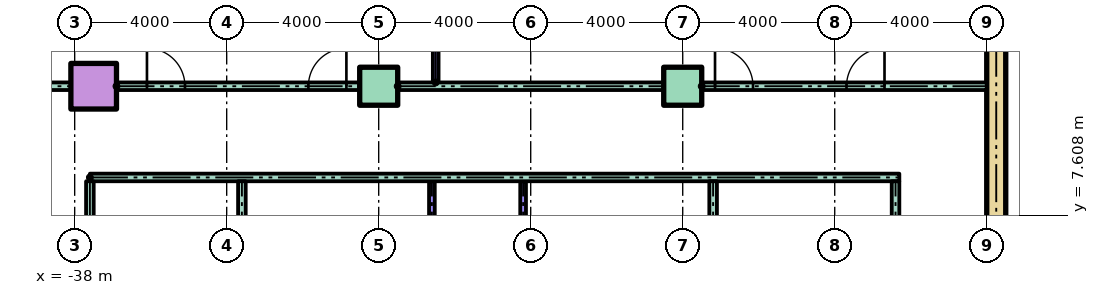
"""IFC4 building model, lengths in metres.
Left out: names, types, materials, properties, quantities, classifications, styles, units other than length and angle.
Written with IfcOpenShell. Run it as: python <this file> out.ifc"""

import sys

from ifc_helpers import new_model, si_unit, direction, frame, frame_2d, origin, origin_2d, place, context, subcontext, project, spatial, rectangle, hollow_rectangle, extrude, element, fill, save


model = new_model("IFC4")
c1 = context("Model", 3, precision=1e-05, world=origin(), true_north=direction((0.0, 1.0)))
c2 = subcontext(c1, "Body", "Model", "MODEL_VIEW")
j1 = project(units=[si_unit("LENGTHUNIT", "METRE"), si_unit("PLANEANGLEUNIT", "RADIAN")], contexts=[c1])
p1 = place(None, origin())
s1 = spatial("IfcSite", under=j1, at=p1, CompositionType="ELEMENT")
p2 = place(p1, origin())
s2 = spatial("IfcBuilding", under=s1, at=p2, CompositionType="ELEMENT")
p3 = place(p2, frame((0.0, 0.0, 14.0)))
s3 = spatial("IfcBuildingStorey", under=s2, at=p3, CompositionType="ELEMENT", Elevation=14.0)
p4 = place(p3, frame((-37.5, 11.0, 0.0)))
e1 = element("IfcColumn", 1, at=p4, inside=s3, PredefinedType="COLUMN", context=c2, shape_type="SweptSolid", body=[
    extrude(hollow_rectangle(XDim=1.2, YDim=1.2, WallThickness=0.06, at=origin_2d()), origin(), (0.0, 0.0, 1.0), 4.0),
])
for number, where in (
    (2, (-30.0, 11.0, 0.0)),
    (3, (-22.0, 11.0, 0.0)),
):
    element("IfcColumn", number, at=place(p3, frame(where)), inside=s3, PredefinedType="COLUMN", context=c2, shape_type="SweptSolid", body=[
        extrude(rectangle(XDim=1.0, YDim=1.0, at=origin_2d()), origin(), (0.0, 0.0, 1.0), 4.0),
    ])
p5 = place(p3, frame((-13.75, 3.0, 0.0), z_axis=(0.0, 0.0, 1.0), x_axis=(0.0, 1.0, 0.0)))
e4 = element("IfcWall", 4, at=p5, inside=s3, PredefinedType="SHEAR", context=c2, shape_type="SweptSolid", body=[
    extrude(rectangle(XDim=17.0, YDim=0.5, at=frame_2d((8.5, 0.0))), origin(), (0.0, 0.0, 1.0), 3.7),
])
p6 = place(p3, frame((-37.6, 8.6, 0.0)))
e5 = element("IfcWall", 5, at=p6, inside=s3, PredefinedType="PARTITIONING", context=c2, shape_type="SweptSolid", body=[
    extrude(rectangle(XDim=21.3, YDim=0.2, at=frame_2d((10.65, 0.0))), origin(), (0.0, 0.0, 1.0), 3.7),
])
p7 = place(p3, frame((-39.6, 11.0, 0.0)))
e6 = element("IfcWall", 6, at=p7, inside=s3, PredefinedType="PARTITIONING", context=c2, shape_type="SweptSolid", body=[
    extrude(rectangle(XDim=1.5, YDim=0.2, at=frame_2d((0.75, 0.0))), origin(), (0.0, 0.0, 1.0), 3.7),
])
p8 = place(p3, frame((-36.9, 11.0, 0.0)))
e7 = element("IfcWall", 7, at=p8, inside=s3, PredefinedType="PARTITIONING", context=c2, shape_type="SweptSolid", body=[
    extrude(rectangle(XDim=6.4, YDim=0.2, at=frame_2d((3.2, 0.0))), origin(), (0.0, 0.0, 1.0), 3.7),
])
p9 = place(p8, frame((0.802, 0.0, 0.0)))
e8 = element("IfcOpeningElement", 8, at=p9, cuts=e7, PredefinedType="OPENING", context=c2, shape_type="SweptSolid", body=[
    extrude(rectangle(XDim=1.0, YDim=2.1, at=frame_2d((0.5, 1.05))), frame((0.0, 0.11, 0.0), z_axis=(0.0, -1.0, 0.0), x_axis=(1.0, 0.0, 0.0)), (0.0, 0.0, 1.0), 0.22),
])
p10 = place(p8, frame((5.05, 0.0, 0.0)))
e9 = element("IfcOpeningElement", 9, at=p10, cuts=e7, PredefinedType="OPENING", context=c2, shape_type="SweptSolid", body=[
    extrude(rectangle(XDim=1.0, YDim=2.1, at=frame_2d((0.5, 1.05))), frame((0.0, 0.11, 0.0), z_axis=(0.0, -1.0, 0.0), x_axis=(1.0, 0.0, 0.0)), (0.0, 0.0, 1.0), 0.22),
])
p11 = place(p3, frame((-29.5, 11.0, 0.0)))
e10 = element("IfcWall", 10, at=p11, inside=s3, PredefinedType="PARTITIONING", context=c2, shape_type="SweptSolid", body=[
    extrude(rectangle(XDim=7.0, YDim=0.2, at=frame_2d((3.5, 0.0))), origin(), (0.0, 0.0, 1.0), 3.7),
])
p12 = place(p3, frame((-21.5, 11.0, 0.0)))
e11 = element("IfcWall", 11, at=p12, inside=s3, PredefinedType="PARTITIONING", context=c2, shape_type="SweptSolid", body=[
    extrude(rectangle(XDim=7.5, YDim=0.2, at=frame_2d((3.75, 0.0))), origin(), (0.0, 0.0, 1.0), 3.7),
])
p13 = place(p12, frame((0.35, 0.0, 0.0)))
e12 = element("IfcOpeningElement", 12, at=p13, cuts=e11, PredefinedType="OPENING", context=c2, shape_type="SweptSolid", body=[
    extrude(rectangle(XDim=1.0, YDim=2.1, at=frame_2d((0.5, 1.05))), frame((0.0, 0.11, 0.0), z_axis=(0.0, -1.0, 0.0), x_axis=(1.0, 0.0, 0.0)), (0.0, 0.0, 1.0), 0.22),
])
p14 = place(p12, frame((3.81, 0.0, 0.0)))
e13 = element("IfcOpeningElement", 13, at=p14, cuts=e11, PredefinedType="OPENING", context=c2, shape_type="SweptSolid", body=[
    extrude(rectangle(XDim=1.0, YDim=2.1, at=frame_2d((0.5, 1.05))), frame((0.0, 0.11, 0.0), z_axis=(0.0, -1.0, 0.0), x_axis=(1.0, 0.0, 0.0)), (0.0, 0.0, 1.0), 0.22),
])
p15 = place(p3, frame((-37.6, 2.6, 0.0), z_axis=(0.0, 0.0, 1.0), x_axis=(0.0, 1.0, 0.0)))
e14 = element("IfcWall", 14, at=p15, inside=s3, PredefinedType="PARTITIONING", context=c2, shape_type="SweptSolid", body=[
    extrude(rectangle(XDim=5.9, YDim=0.2, at=frame_2d((2.95, 0.0))), origin(), (0.0, 0.0, 1.0), 3.7),
])
p16 = place(p15, frame((1.95, 0.0, 0.0)))
e15 = element("IfcOpeningElement", 15, at=p16, cuts=e14, PredefinedType="OPENING", context=c2, shape_type="SweptSolid", body=[
    extrude(rectangle(XDim=0.9, YDim=2.1, at=frame_2d((0.45, 1.05))), frame((0.0, 0.11, 0.0), z_axis=(0.0, -1.0, 0.0), x_axis=(1.0, 0.0, 0.0)), (0.0, 0.0, 1.0), 0.22),
])
p17 = place(p3, frame((-33.6, 1.5, 0.0), z_axis=(0.0, 0.0, 1.0), x_axis=(0.0, 1.0, 0.0)))
e16 = element("IfcWall", 16, at=p17, inside=s3, PredefinedType="PARTITIONING", context=c2, shape_type="SweptSolid", body=[
    extrude(rectangle(XDim=7.0, YDim=0.2, at=frame_2d((3.5, 0.0))), origin(), (0.0, 0.0, 1.0), 3.7),
])
p18 = place(p3, frame((-28.6, 1.5, 0.0), z_axis=(0.0, 0.0, 1.0), x_axis=(0.0, 1.0, 0.0)))
e17 = element("IfcWall", 17, at=p18, inside=s3, PredefinedType="PARTITIONING", context=c2, shape_type="SweptSolid", body=[
    extrude(rectangle(XDim=7.0, YDim=0.15, at=frame_2d((3.5, 0.0))), origin(), (0.0, 0.0, 1.0), 3.7),
])
p19 = place(p3, frame((-28.5, 11.1, 0.0), z_axis=(0.0, 0.0, 1.0), x_axis=(0.0, 1.0, 0.0)))
e18 = element("IfcWall", 18, at=p19, inside=s3, PredefinedType="PARTITIONING", context=c2, shape_type="SweptSolid", body=[
    extrude(rectangle(XDim=8.5, YDim=0.15, at=frame_2d((4.25, 0.0))), origin(), (0.0, 0.0, 1.0), 3.7),
])
p20 = place(p3, frame((-26.2, 1.5, 0.0), z_axis=(0.0, 0.0, 1.0), x_axis=(0.0, 1.0, 0.0)))
e19 = element("IfcWall", 19, at=p20, inside=s3, PredefinedType="PARTITIONING", context=c2, shape_type="SweptSolid", body=[
    extrude(rectangle(XDim=7.0, YDim=0.15, at=frame_2d((3.5, 0.0))), origin(), (0.0, 0.0, 1.0), 3.7),
])
p21 = place(p3, frame((-21.2, 1.5, 0.0), z_axis=(0.0, 0.0, 1.0), x_axis=(0.0, 1.0, 0.0)))
e20 = element("IfcWall", 20, at=p21, inside=s3, PredefinedType="PARTITIONING", context=c2, shape_type="SweptSolid", body=[
    extrude(rectangle(XDim=7.0, YDim=0.2, at=frame_2d((3.5, 0.0))), origin(), (0.0, 0.0, 1.0), 3.7),
])
p22 = place(p3, frame((-16.4, 1.5, 0.0), z_axis=(0.0, 0.0, 1.0), x_axis=(0.0, 1.0, 0.0)))
e21 = element("IfcWall", 21, at=p22, inside=s3, PredefinedType="PARTITIONING", context=c2, shape_type="SweptSolid", body=[
    extrude(rectangle(XDim=7.0, YDim=0.2, at=frame_2d((3.5, 0.0))), origin(), (0.0, 0.0, 1.0), 3.7),
])
p23 = place(p22, frame((3.05, 0.0, 0.0)))
e22 = element("IfcOpeningElement", 22, at=p23, cuts=e21, PredefinedType="OPENING", context=c2, shape_type="SweptSolid", body=[
    extrude(rectangle(XDim=0.9, YDim=2.1, at=frame_2d((0.45, 1.05))), frame((0.0, 0.11, 0.0), z_axis=(0.0, -1.0, 0.0), x_axis=(1.0, 0.0, 0.0)), (0.0, 0.0, 1.0), 0.22),
])
p24 = place(p9, origin())
e23 = element("IfcDoor", 23, at=p24, inside=s3, OperationType="SINGLE_SWING_LEFT", PredefinedType="DOOR", context=c2, shape_type="SweptSolid", body=[
    extrude(rectangle(XDim=1.0, YDim=2.1, at=frame_2d((0.5, 1.05))), frame((0.0, 0.025, 0.0), z_axis=(0.0, -1.0, 0.0), x_axis=(1.0, 0.0, 0.0)), (0.0, 0.0, 1.0), 0.05),
])
fill(e8, e23)
p25 = place(p10, origin())
e24 = element("IfcDoor", 24, at=p25, inside=s3, OperationType="SINGLE_SWING_RIGHT", PredefinedType="DOOR", context=c2, shape_type="SweptSolid", body=[
    extrude(rectangle(XDim=1.0, YDim=2.1, at=frame_2d((0.5, 1.05))), frame((0.0, 0.025, 0.0), z_axis=(0.0, -1.0, 0.0), x_axis=(1.0, 0.0, 0.0)), (0.0, 0.0, 1.0), 0.05),
])
fill(e9, e24)
p26 = place(p13, origin())
e25 = element("IfcDoor", 25, at=p26, inside=s3, OperationType="SINGLE_SWING_LEFT", PredefinedType="DOOR", context=c2, shape_type="SweptSolid", body=[
    extrude(rectangle(XDim=1.0, YDim=2.1, at=frame_2d((0.5, 1.05))), frame((0.0, 0.025, 0.0), z_axis=(0.0, -1.0, 0.0), x_axis=(1.0, 0.0, 0.0)), (0.0, 0.0, 1.0), 0.05),
])
fill(e12, e25)
p27 = place(p14, origin())
e26 = element("IfcDoor", 26, at=p27, inside=s3, OperationType="SINGLE_SWING_RIGHT", PredefinedType="DOOR", context=c2, shape_type="SweptSolid", body=[
    extrude(rectangle(XDim=1.0, YDim=2.1, at=frame_2d((0.5, 1.05))), frame((0.0, 0.025, 0.0), z_axis=(0.0, -1.0, 0.0), x_axis=(1.0, 0.0, 0.0)), (0.0, 0.0, 1.0), 0.05),
])
fill(e13, e26)
save(model, sys.argv[1])
